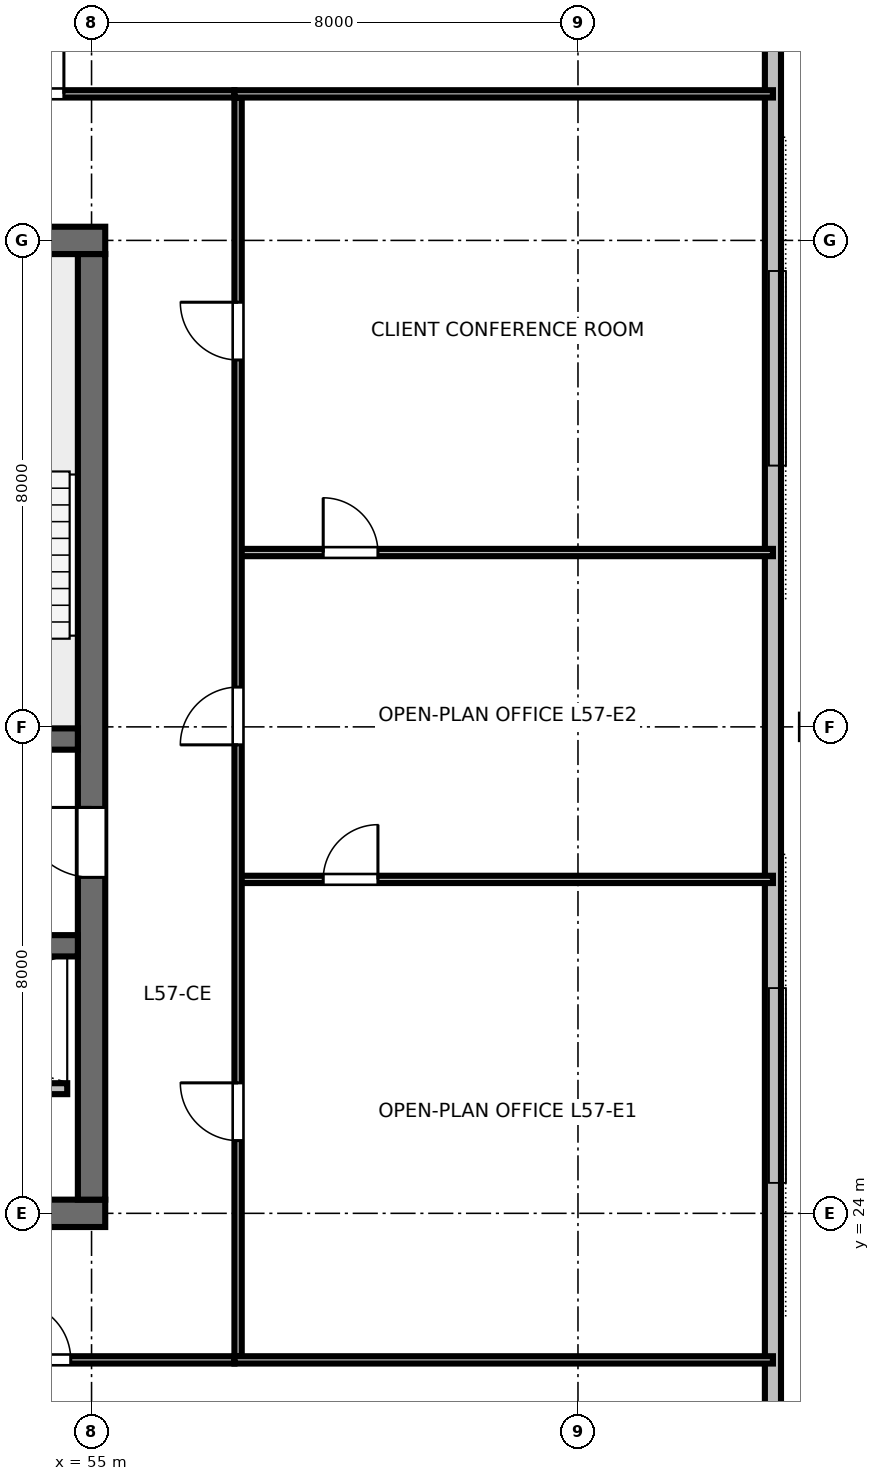
"""IFC4 building model, lengths in metres.
Left out: names, types, materials, properties, quantities, classifications, styles, units other than length and angle.
Written with IfcOpenShell. Run it as: python <this file> out.ifc"""

import sys

from ifc_helpers import new_model, si_unit, direction, frame, frame_2d, origin, origin_2d, place, context, subcontext, project, spatial, rectangle, hollow_rectangle, i_section, extrude, element, fill, save


model = new_model("IFC4")
c1 = context("Model", 3, precision=1e-05, world=origin(), true_north=direction((0.0, 1.0)))
c2 = subcontext(c1, "Body", "Model", "MODEL_VIEW")
j1 = project(units=[si_unit("LENGTHUNIT", "METRE"), si_unit("PLANEANGLEUNIT", "RADIAN")], contexts=[c1])
p1 = place(None, origin())
s1 = spatial("IfcSite", under=j1, at=p1, CompositionType="ELEMENT")
p2 = place(p1, origin())
s2 = spatial("IfcBuilding", under=s1, at=p2, CompositionType="ELEMENT")
p3 = place(p2, frame((0.0, 0.0, 216.6)))
s3 = spatial("IfcBuildingStorey", under=s2, at=p3, CompositionType="ELEMENT", Elevation=216.6)
p4 = place(p3, frame((36.775, 24.0, 0.0), z_axis=(0.0, 0.0, 1.0), x_axis=(1.0, 0.0, 0.0)))
e1 = element("IfcWall", 1, at=p4, inside=s3, PredefinedType="SHEAR", context=c2, shape_type="SweptSolid", body=[
    extrude(rectangle(XDim=18.45, YDim=0.45, at=frame_2d((9.225, 0.0))), origin(), (0.0, 0.0, 1.0), 3.36),
])
p5 = place(p4, frame((13.425, 0.0, 0.0)))
e2 = element("IfcOpeningElement", 2, at=p5, cuts=e1, PredefinedType="OPENING", context=c2, shape_type="SweptSolid", body=[
    extrude(rectangle(XDim=1.6, YDim=2.15, at=frame_2d((0.8, 1.075))), frame((0.0, 0.235, 0.0), z_axis=(0.0, -1.0, 0.0), x_axis=(1.0, 0.0, 0.0)), (0.0, 0.0, 1.0), 0.47),
])
p6 = place(p3, frame((36.775, 40.0, 0.0), z_axis=(0.0, 0.0, 1.0), x_axis=(1.0, 0.0, 0.0)))
e3 = element("IfcWall", 3, at=p6, inside=s3, PredefinedType="SHEAR", context=c2, shape_type="SweptSolid", body=[
    extrude(rectangle(XDim=18.45, YDim=0.45, at=frame_2d((9.225, 0.0))), origin(), (0.0, 0.0, 1.0), 3.36),
])
p7 = place(p6, frame((8.725, 0.0, 0.0)))
e4 = element("IfcOpeningElement", 4, at=p7, cuts=e3, PredefinedType="OPENING", context=c2, shape_type="SweptSolid", body=[
    extrude(rectangle(XDim=1.0, YDim=2.15, at=frame_2d((0.5, 1.075))), frame((0.0, 0.235, 0.0), z_axis=(0.0, -1.0, 0.0), x_axis=(1.0, 0.0, 0.0)), (0.0, 0.0, 1.0), 0.47),
])
p8 = place(p3, frame((55.0, 24.225, 0.0), z_axis=(0.0, 0.0, 1.0), x_axis=(0.0, 1.0, 0.0)))
e5 = element("IfcWall", 5, at=p8, inside=s3, PredefinedType="SHEAR", context=c2, shape_type="SweptSolid", body=[
    extrude(rectangle(XDim=15.55, YDim=0.45, at=frame_2d((7.775, 0.0))), origin(), (0.0, 0.0, 1.0), 3.36),
])
p9 = place(p8, frame((5.3, 0.0, 0.0)))
e6 = element("IfcOpeningElement", 6, at=p9, cuts=e5, PredefinedType="OPENING", context=c2, shape_type="SweptSolid", body=[
    extrude(rectangle(XDim=1.15, YDim=2.15, at=frame_2d((0.575, 1.075))), frame((0.0, 0.235, 0.0), z_axis=(0.0, -1.0, 0.0), x_axis=(1.0, 0.0, 0.0)), (0.0, 0.0, 1.0), 0.47),
])
p10 = place(p3, frame((37.225, 31.8, 0.0), z_axis=(0.0, 0.0, 1.0), x_axis=(1.0, 0.0, 0.0)))
e7 = element("IfcWall", 7, at=p10, inside=s3, PredefinedType="SHEAR", context=c2, shape_type="SweptSolid", body=[
    extrude(rectangle(XDim=17.55, YDim=0.35, at=frame_2d((8.775, 0.0))), origin(), (0.0, 0.0, 1.0), 3.36),
])
p11 = place(p10, frame((0.825, 0.0, 0.0)))
e8 = element("IfcOpeningElement", 8, at=p11, cuts=e7, PredefinedType="OPENING", context=c2, shape_type="SweptSolid", body=[
    extrude(rectangle(XDim=1.1, YDim=2.15, at=frame_2d((0.55, 1.075))), frame((0.0, 0.185, 0.0), z_axis=(0.0, -1.0, 0.0), x_axis=(1.0, 0.0, 0.0)), (0.0, 0.0, 1.0), 0.37),
])
p12 = place(p10, frame((14.725, 0.0, 0.0)))
e9 = element("IfcOpeningElement", 9, at=p12, cuts=e7, PredefinedType="OPENING", context=c2, shape_type="SweptSolid", body=[
    extrude(rectangle(XDim=1.1, YDim=2.15, at=frame_2d((0.55, 1.075))), frame((0.0, 0.185, 0.0), z_axis=(0.0, -1.0, 0.0), x_axis=(1.0, 0.0, 0.0)), (0.0, 0.0, 1.0), 0.37),
])
p13 = place(p3, frame((37.225, 28.4, 0.0), z_axis=(0.0, 0.0, 1.0), x_axis=(1.0, 0.0, 0.0)))
e10 = element("IfcWall", 10, at=p13, inside=s3, PredefinedType="SHEAR", context=c2, shape_type="SweptSolid", body=[
    extrude(rectangle(XDim=17.55, YDim=0.35, at=frame_2d((8.775, 0.0))), origin(), (0.0, 0.0, 1.0), 3.36),
])
p14 = place(p3, frame((66.963, 19.905, 0.0), z_axis=(-0.177528506803, 0.155864964768, 0.97169426366), x_axis=(0.730198143029, -0.641093139838, 0.236241947947)))
e11 = element("IfcColumn", 11, at=p14, inside=s3, PredefinedType="COLUMN", context=c2, shape_type="SweptSolid", body=[
    extrude(hollow_rectangle(XDim=0.7, YDim=0.85, WallThickness=0.04, at=origin_2d()), origin(), (0.0, 0.0, 1.0), 3.471),
])
p15 = place(p3, frame((66.866, 32.0, 0.0), z_axis=(-0.17903584331, 0.0, 0.98384255184), x_axis=(0.98384255184, 0.0, 0.17903584331)))
e12 = element("IfcColumn", 12, at=p15, inside=s3, PredefinedType="COLUMN", context=c2, shape_type="SweptSolid", body=[
    extrude(i_section(OverallWidth=0.401, OverallDepth=0.399, WebThickness=0.025, FlangeThickness=0.04, FilletRadius=0.025, at=origin_2d()), origin(), (0.0, 0.0, 1.0), 3.428),
])
p16 = place(p3, frame((66.963, 44.095, 0.0), z_axis=(-0.177528506803, -0.155864964768, 0.97169426366), x_axis=(0.730198143029, 0.641093139838, 0.236241947947)))
e13 = element("IfcColumn", 13, at=p16, inside=s3, PredefinedType="COLUMN", context=c2, shape_type="SweptSolid", body=[
    extrude(hollow_rectangle(XDim=0.7, YDim=0.85, WallThickness=0.04, at=origin_2d()), origin(), (0.0, 0.0, 1.0), 3.471),
])
p17 = place(p3, frame((66.206, 19.305, 0.0), z_axis=(0.0, 0.0, 1.0), x_axis=(0.0, 1.0, 0.0)))
e14 = element("IfcWall", 14, at=p17, inside=s3, PredefinedType="STANDARD", context=c2, shape_type="SweptSolid", body=[
    extrude(rectangle(XDim=25.389, YDim=0.265, at=frame_2d((12.695, 0.0))), origin(), (0.0, 0.0, 1.0), 2.832),
])
p18 = place(p3, frame((47.6, 26.05, 0.0), z_axis=(0.0, 0.0, 1.0), x_axis=(1.0, 0.0, 0.0)))
e15 = element("IfcWall", 15, at=p18, inside=s3, PredefinedType="PARTITIONING", context=c2, shape_type="SweptSolid", body=[
    extrude(rectangle(XDim=7.0, YDim=0.18, at=frame_2d((3.5, 0.0))), origin(), (0.0, 0.0, 1.0), 3.375),
])
p19 = place(p18, frame((1.2, 0.0, 0.0)))
e16 = element("IfcOpeningElement", 16, at=p19, cuts=e15, PredefinedType="OPENING", context=c2, shape_type="SweptSolid", body=[
    extrude(rectangle(XDim=1.05, YDim=2.15, at=frame_2d((0.525, 1.075))), frame((0.0, 0.1, 0.0), z_axis=(0.0, -1.0, 0.0), x_axis=(1.0, 0.0, 0.0)), (0.0, 0.0, 1.0), 0.2),
])
p20 = place(p18, frame((3.4, 0.0, 0.0)))
e17 = element("IfcOpeningElement", 17, at=p20, cuts=e15, PredefinedType="OPENING", context=c2, shape_type="SweptSolid", body=[
    extrude(rectangle(XDim=1.05, YDim=2.15, at=frame_2d((0.525, 1.075))), frame((0.0, 0.1, 0.0), z_axis=(0.0, -1.0, 0.0), x_axis=(1.0, 0.0, 0.0)), (0.0, 0.0, 1.0), 0.2),
])
p21 = place(p3, frame((47.02, 21.59, 0.0), z_axis=(0.0, 0.0, 1.0), x_axis=(1.0, 0.0, 0.0)))
e18 = element("IfcWall", 18, at=p21, inside=s3, PredefinedType="PARTITIONING", context=c2, shape_type="SweptSolid", body=[
    extrude(rectangle(XDim=10.33, YDim=0.12, at=frame_2d((5.165, 0.0))), origin(), (0.0, 0.0, 1.0), 2.655),
])
p22 = place(p21, frame((1.593, 0.0, 0.0)))
e19 = element("IfcOpeningElement", 19, at=p22, cuts=e18, PredefinedType="OPENING", context=c2, shape_type="SweptSolid", body=[
    extrude(rectangle(XDim=0.95, YDim=2.15, at=frame_2d((0.475, 1.075))), frame((0.0, 0.07, 0.0), z_axis=(0.0, -1.0, 0.0), x_axis=(1.0, 0.0, 0.0)), (0.0, 0.0, 1.0), 0.14),
])
p23 = place(p21, frame((6.688, 0.0, 0.0)))
e20 = element("IfcOpeningElement", 20, at=p23, cuts=e18, PredefinedType="OPENING", context=c2, shape_type="SweptSolid", body=[
    extrude(rectangle(XDim=0.95, YDim=2.15, at=frame_2d((0.475, 1.075))), frame((0.0, 0.07, 0.0), z_axis=(0.0, -1.0, 0.0), x_axis=(1.0, 0.0, 0.0)), (0.0, 0.0, 1.0), 0.14),
])
p24 = place(p3, frame((47.02, 42.41, 0.0), z_axis=(0.0, 0.0, 1.0), x_axis=(1.0, 0.0, 0.0)))
e21 = element("IfcWall", 21, at=p24, inside=s3, PredefinedType="PARTITIONING", context=c2, shape_type="SweptSolid", body=[
    extrude(rectangle(XDim=10.33, YDim=0.12, at=frame_2d((5.165, 0.0))), origin(), (0.0, 0.0, 1.0), 2.655),
])
p25 = place(p24, frame((1.48, 0.0, 0.0)))
e22 = element("IfcOpeningElement", 22, at=p25, cuts=e21, PredefinedType="OPENING", context=c2, shape_type="SweptSolid", body=[
    extrude(rectangle(XDim=0.95, YDim=2.15, at=frame_2d((0.475, 1.075))), frame((0.0, 0.07, 0.0), z_axis=(0.0, -1.0, 0.0), x_axis=(1.0, 0.0, 0.0)), (0.0, 0.0, 1.0), 0.14),
])
p26 = place(p24, frame((6.575, 0.0, 0.0)))
e23 = element("IfcOpeningElement", 23, at=p26, cuts=e21, PredefinedType="OPENING", context=c2, shape_type="SweptSolid", body=[
    extrude(rectangle(XDim=0.95, YDim=2.15, at=frame_2d((0.475, 1.075))), frame((0.0, 0.07, 0.0), z_axis=(0.0, -1.0, 0.0), x_axis=(1.0, 0.0, 0.0)), (0.0, 0.0, 1.0), 0.14),
])
p27 = place(p3, frame((57.41, 29.492, 0.0), z_axis=(0.0, 0.0, 1.0), x_axis=(1.0, 0.0, 0.0)))
e24 = element("IfcWall", 24, at=p27, inside=s3, PredefinedType="PARTITIONING", context=c2, shape_type="SweptSolid", body=[
    extrude(rectangle(XDim=8.796, YDim=0.12, at=frame_2d((4.398, 0.0))), origin(), (0.0, 0.0, 1.0), 2.655),
])
p28 = place(p27, frame((1.4, 0.0, 0.0)))
e25 = element("IfcOpeningElement", 25, at=p28, cuts=e24, PredefinedType="OPENING", context=c2, shape_type="SweptSolid", body=[
    extrude(rectangle(XDim=0.9, YDim=2.15, at=frame_2d((0.45, 1.075))), frame((0.0, 0.07, 0.0), z_axis=(0.0, -1.0, 0.0), x_axis=(1.0, 0.0, 0.0)), (0.0, 0.0, 1.0), 0.14),
])
p29 = place(p3, frame((57.41, 34.867, 0.0), z_axis=(0.0, 0.0, 1.0), x_axis=(1.0, 0.0, 0.0)))
e26 = element("IfcWall", 26, at=p29, inside=s3, PredefinedType="PARTITIONING", context=c2, shape_type="SweptSolid", body=[
    extrude(rectangle(XDim=8.796, YDim=0.12, at=frame_2d((4.398, 0.0))), origin(), (0.0, 0.0, 1.0), 2.655),
])
p30 = place(p29, frame((1.4, 0.0, 0.0)))
e27 = element("IfcOpeningElement", 27, at=p30, cuts=e26, PredefinedType="OPENING", context=c2, shape_type="SweptSolid", body=[
    extrude(rectangle(XDim=0.9, YDim=2.15, at=frame_2d((0.45, 1.075))), frame((0.0, 0.07, 0.0), z_axis=(0.0, -1.0, 0.0), x_axis=(1.0, 0.0, 0.0)), (0.0, 0.0, 1.0), 0.14),
])
p31 = place(p3, frame((57.41, 21.65, 0.0), z_axis=(0.0, 0.0, 1.0), x_axis=(0.0, 1.0, 0.0)))
e28 = element("IfcWall", 28, at=p31, inside=s3, PredefinedType="PARTITIONING", context=c2, shape_type="SweptSolid", body=[
    extrude(rectangle(XDim=20.7, YDim=0.12, at=frame_2d((10.35, 0.0))), origin(), (0.0, 0.0, 1.0), 2.655),
])
p32 = place(p31, frame((3.546, 0.0, 0.0)))
e29 = element("IfcOpeningElement", 29, at=p32, cuts=e28, PredefinedType="OPENING", context=c2, shape_type="SweptSolid", body=[
    extrude(rectangle(XDim=0.95, YDim=2.15, at=frame_2d((0.475, 1.075))), frame((0.0, 0.07, 0.0), z_axis=(0.0, -1.0, 0.0), x_axis=(1.0, 0.0, 0.0)), (0.0, 0.0, 1.0), 0.14),
])
p33 = place(p31, frame((10.054, 0.0, 0.0)))
e30 = element("IfcOpeningElement", 30, at=p33, cuts=e28, PredefinedType="OPENING", context=c2, shape_type="SweptSolid", body=[
    extrude(rectangle(XDim=0.95, YDim=2.15, at=frame_2d((0.475, 1.075))), frame((0.0, 0.07, 0.0), z_axis=(0.0, -1.0, 0.0), x_axis=(1.0, 0.0, 0.0)), (0.0, 0.0, 1.0), 0.14),
])
p34 = place(p31, frame((16.384, 0.0, 0.0)))
e31 = element("IfcOpeningElement", 31, at=p34, cuts=e28, PredefinedType="OPENING", context=c2, shape_type="SweptSolid", body=[
    extrude(rectangle(XDim=0.95, YDim=2.15, at=frame_2d((0.475, 1.075))), frame((0.0, 0.07, 0.0), z_axis=(0.0, -1.0, 0.0), x_axis=(1.0, 0.0, 0.0)), (0.0, 0.0, 1.0), 0.14),
])
for number, where, z_axis, x_axis in (
    (32, (57.35, 21.59, 0.0), (0.0, 0.0, 1.0), (1.0, 0.0, 0.0)),
    (33, (57.35, 42.41, 0.0), (0.0, 0.0, 1.0), (1.0, 0.0, 0.0)),
):
    element("IfcWall", number, at=place(p3, frame(where, z_axis=z_axis, x_axis=x_axis)), inside=s3, PredefinedType="PARTITIONING", context=c2, shape_type="SweptSolid", body=[
        extrude(rectangle(XDim=8.856, YDim=0.12, at=frame_2d((4.428, 0.0))), origin(), (0.0, 0.0, 1.0), 2.655),
    ])
p35 = place(p9, origin())
e34 = element("IfcDoor", 34, at=p35, inside=s3, OperationType="SINGLE_SWING_RIGHT", PredefinedType="DOOR", context=c2, shape_type="SweptSolid", body=[
    extrude(rectangle(XDim=1.15, YDim=2.15, at=frame_2d((0.575, 1.075))), frame((0.0, 0.025, 0.0), z_axis=(0.0, -1.0, 0.0), x_axis=(1.0, 0.0, 0.0)), (0.0, 0.0, 1.0), 0.05),
])
fill(e6, e34)
p36 = place(p23, origin())
e35 = element("IfcDoor", 35, at=p36, inside=s3, OperationType="SINGLE_SWING_LEFT", PredefinedType="DOOR", context=c2, shape_type="SweptSolid", body=[
    extrude(rectangle(XDim=0.95, YDim=2.15, at=frame_2d((0.475, 1.075))), frame((0.0, 0.025, 0.0), z_axis=(0.0, -1.0, 0.0), x_axis=(1.0, 0.0, 0.0)), (0.0, 0.0, 1.0), 0.05),
])
fill(e20, e35)
p37 = place(p26, origin())
e36 = element("IfcDoor", 36, at=p37, inside=s3, OperationType="SINGLE_SWING_RIGHT", PredefinedType="DOOR", context=c2, shape_type="SweptSolid", body=[
    extrude(rectangle(XDim=0.95, YDim=2.15, at=frame_2d((0.475, 1.075))), frame((0.0, 0.025, 0.0), z_axis=(0.0, -1.0, 0.0), x_axis=(1.0, 0.0, 0.0)), (0.0, 0.0, 1.0), 0.05),
])
fill(e23, e36)
p38 = place(p28, origin())
e37 = element("IfcDoor", 37, at=p38, inside=s3, OperationType="SINGLE_SWING_RIGHT", PredefinedType="DOOR", context=c2, shape_type="SweptSolid", body=[
    extrude(rectangle(XDim=0.9, YDim=2.15, at=frame_2d((0.45, 1.075))), frame((0.0, 0.025, 0.0), z_axis=(0.0, -1.0, 0.0), x_axis=(1.0, 0.0, 0.0)), (0.0, 0.0, 1.0), 0.05),
])
fill(e25, e37)
p39 = place(p30, origin())
e38 = element("IfcDoor", 38, at=p39, inside=s3, OperationType="SINGLE_SWING_LEFT", PredefinedType="DOOR", context=c2, shape_type="SweptSolid", body=[
    extrude(rectangle(XDim=0.9, YDim=2.15, at=frame_2d((0.45, 1.075))), frame((0.0, 0.025, 0.0), z_axis=(0.0, -1.0, 0.0), x_axis=(1.0, 0.0, 0.0)), (0.0, 0.0, 1.0), 0.05),
])
fill(e27, e38)
p40 = place(p32, origin())
e39 = element("IfcDoor", 39, at=p40, inside=s3, OperationType="SINGLE_SWING_RIGHT", PredefinedType="DOOR", context=c2, shape_type="SweptSolid", body=[
    extrude(rectangle(XDim=0.95, YDim=2.15, at=frame_2d((0.475, 1.075))), frame((0.0, 0.025, 0.0), z_axis=(0.0, -1.0, 0.0), x_axis=(1.0, 0.0, 0.0)), (0.0, 0.0, 1.0), 0.05),
])
fill(e29, e39)
p41 = place(p33, origin())
e40 = element("IfcDoor", 40, at=p41, inside=s3, OperationType="SINGLE_SWING_LEFT", PredefinedType="DOOR", context=c2, shape_type="SweptSolid", body=[
    extrude(rectangle(XDim=0.95, YDim=2.15, at=frame_2d((0.475, 1.075))), frame((0.0, 0.025, 0.0), z_axis=(0.0, -1.0, 0.0), x_axis=(1.0, 0.0, 0.0)), (0.0, 0.0, 1.0), 0.05),
])
fill(e30, e40)
p42 = place(p34, origin())
e41 = element("IfcDoor", 41, at=p42, inside=s3, OperationType="SINGLE_SWING_RIGHT", PredefinedType="DOOR", context=c2, shape_type="SweptSolid", body=[
    extrude(rectangle(XDim=0.95, YDim=2.15, at=frame_2d((0.475, 1.075))), frame((0.0, 0.025, 0.0), z_axis=(0.0, -1.0, 0.0), x_axis=(1.0, 0.0, 0.0)), (0.0, 0.0, 1.0), 0.05),
])
fill(e31, e41)
save(model, sys.argv[1])
